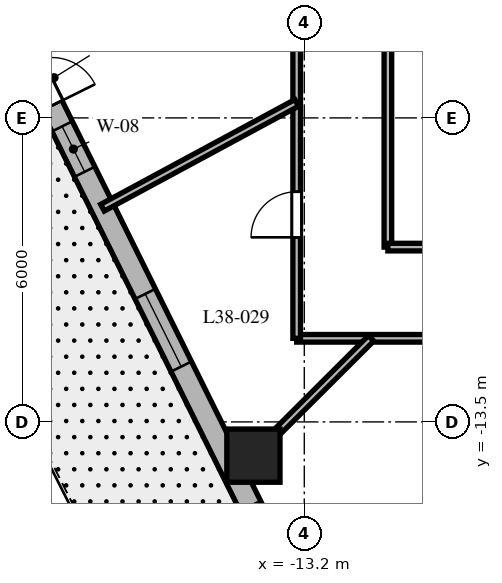
"""IFC4 building model, lengths in metres.
Left out: names, types, materials, properties, quantities, classifications, styles, units other than length and angle.
Written with IfcOpenShell. Run it as: python <this file> out.ifc"""

import sys

from ifc_helpers import new_model, si_unit, direction, frame, frame_2d, origin, origin_2d, place, context, subcontext, project, spatial, rectangle, extrude, element, fill, save


model = new_model("IFC4")
c1 = context("Model", 3, precision=1e-05, world=origin(), true_north=direction((0.0, 1.0)))
c2 = subcontext(c1, "Body", "Model", "MODEL_VIEW")
j1 = project(units=[si_unit("LENGTHUNIT", "METRE"), si_unit("PLANEANGLEUNIT", "RADIAN")], contexts=[c1])
p1 = place(None, origin())
s1 = spatial("IfcSite", under=j1, at=p1, CompositionType="ELEMENT")
p2 = place(p1, origin())
s2 = spatial("IfcBuilding", under=s1, at=p2, CompositionType="ELEMENT")
p3 = place(p2, frame((0.0, 0.0, 155.4)))
s3 = spatial("IfcBuildingStorey", under=s2, at=p3, CompositionType="ELEMENT", Elevation=155.4)
p4 = place(p3, frame((-14.204, -14.166, 0.0), z_axis=(0.0, 0.0, 1.0), x_axis=(1.0, 0.0, 0.0)))
e1 = element("IfcColumn", 1, at=p4, inside=s3, PredefinedType="COLUMN", context=c2, shape_type="SweptSolid", body=[
    extrude(rectangle(XDim=1.05, YDim=1.05, at=origin_2d()), origin(), (0.0, 0.0, 1.0), 3.7),
])
p5 = place(p3, frame((-20.618, -2.344, 0.0), z_axis=(0.0, 0.0, 1.0), x_axis=(0.444243691097, -0.895905990002, 0.0)))
e2 = element("IfcWall", 2, at=p5, inside=s3, PredefinedType="SOLIDWALL", context=c2, shape_type="SweptSolid", body=[
    extrude(rectangle(XDim=16.784, YDim=0.45, at=frame_2d((8.392, 0.0))), origin(), (0.0, 0.0, 1.0), 3.4),
])
p6 = place(p5, frame((4.535, 0.0, 0.0)))
e3 = element("IfcOpeningElement", 3, at=p6, cuts=e2, PredefinedType="OPENING", context=c2, shape_type="SweptSolid", body=[
    extrude(rectangle(XDim=0.95, YDim=2.15, at=frame_2d((0.475, 1.075))), frame((0.0, 0.235, 0.0), z_axis=(0.0, -1.0, 0.0), x_axis=(1.0, 0.0, 0.0)), (0.0, 0.0, 1.0), 0.47),
])
p7 = place(p5, frame((0.931, 0.0, 0.8)))
e4 = element("IfcOpeningElement", 4, at=p7, cuts=e2, PredefinedType="OPENING", context=c2, shape_type="SweptSolid", body=[
    extrude(rectangle(XDim=1.6, YDim=1.75, at=frame_2d((0.8, 0.875))), frame((0.0, 0.235, 0.0), z_axis=(0.0, -1.0, 0.0), x_axis=(1.0, 0.0, 0.0)), (0.0, 0.0, 1.0), 0.47),
])
p8 = place(p5, frame((5.942, 0.0, 0.8)))
e5 = element("IfcOpeningElement", 5, at=p8, cuts=e2, PredefinedType="OPENING", context=c2, shape_type="SweptSolid", body=[
    extrude(rectangle(XDim=1.0, YDim=1.65, at=frame_2d((0.5, 0.825))), frame((0.0, 0.235, 0.0), z_axis=(0.0, -1.0, 0.0), x_axis=(1.0, 0.0, 0.0)), (0.0, 0.0, 1.0), 0.47),
])
p9 = place(p5, frame((9.633, 0.0, 0.8)))
e6 = element("IfcOpeningElement", 6, at=p9, cuts=e2, PredefinedType="OPENING", context=c2, shape_type="SweptSolid", body=[
    extrude(rectangle(XDim=1.6, YDim=1.75, at=frame_2d((0.8, 0.875))), frame((0.0, 0.235, 0.0), z_axis=(0.0, -1.0, 0.0), x_axis=(1.0, 0.0, 0.0)), (0.0, 0.0, 1.0), 0.47),
])
p10 = place(p5, frame((14.303, 0.0, 0.8)))
e7 = element("IfcOpeningElement", 7, at=p10, cuts=e2, PredefinedType="OPENING", context=c2, shape_type="SweptSolid", body=[
    extrude(rectangle(XDim=1.6, YDim=1.75, at=frame_2d((0.8, 0.875))), frame((0.0, 0.235, 0.0), z_axis=(0.0, -1.0, 0.0), x_axis=(1.0, 0.0, 0.0)), (0.0, 0.0, 1.0), 0.47),
])
p11 = place(p3, frame((13.35, -11.85, 0.0), z_axis=(0.0, 0.0, 1.0), x_axis=(-1.0, 0.0, 0.0)))
e8 = element("IfcWall", 8, at=p11, inside=s3, PredefinedType="PARTITIONING", context=c2, shape_type="SweptSolid", body=[
    extrude(rectangle(XDim=26.7, YDim=0.15, at=frame_2d((13.35, 0.0))), origin(), (0.0, 0.0, 1.0), 2.84),
])
p12 = place(p11, frame((20.682, 0.0, 0.0)))
e9 = element("IfcOpeningElement", 9, at=p12, cuts=e8, PredefinedType="OPENING", context=c2, shape_type="SweptSolid", body=[
    extrude(rectangle(XDim=0.95, YDim=2.03, at=frame_2d((0.475, 1.015))), frame((0.0, 0.085, 0.0), z_axis=(0.0, -1.0, 0.0), x_axis=(1.0, 0.0, 0.0)), (0.0, 0.0, 1.0), 0.17),
])
p13 = place(p11, frame((12.362, 0.0, 0.0)))
e10 = element("IfcOpeningElement", 10, at=p13, cuts=e8, PredefinedType="OPENING", context=c2, shape_type="SweptSolid", body=[
    extrude(rectangle(XDim=0.95, YDim=2.03, at=frame_2d((0.475, 1.015))), frame((0.0, 0.085, 0.0), z_axis=(0.0, -1.0, 0.0), x_axis=(1.0, 0.0, 0.0)), (0.0, 0.0, 1.0), 0.17),
])
p14 = place(p11, frame((3.995, 0.0, 0.0)))
e11 = element("IfcOpeningElement", 11, at=p14, cuts=e8, PredefinedType="OPENING", context=c2, shape_type="SweptSolid", body=[
    extrude(rectangle(XDim=0.95, YDim=2.03, at=frame_2d((0.475, 1.015))), frame((0.0, 0.085, 0.0), z_axis=(0.0, -1.0, 0.0), x_axis=(1.0, 0.0, 0.0)), (0.0, 0.0, 1.0), 0.17),
])
p15 = place(p3, frame((-13.35, -11.85, 0.0), z_axis=(0.0, 0.0, 1.0), x_axis=(0.0, 1.0, 0.0)))
e12 = element("IfcWall", 12, at=p15, inside=s3, PredefinedType="PARTITIONING", context=c2, shape_type="SweptSolid", body=[
    extrude(rectangle(XDim=23.7, YDim=0.15, at=frame_2d((11.85, 0.0))), origin(), (0.0, 0.0, 1.0), 2.84),
])
p16 = place(p15, frame((18.389, 0.0, 0.0)))
e13 = element("IfcOpeningElement", 13, at=p16, cuts=e12, PredefinedType="OPENING", context=c2, shape_type="SweptSolid", body=[
    extrude(rectangle(XDim=0.95, YDim=2.03, at=frame_2d((0.475, 1.015))), frame((0.0, 0.085, 0.0), z_axis=(0.0, -1.0, 0.0), x_axis=(1.0, 0.0, 0.0)), (0.0, 0.0, 1.0), 0.17),
])
p17 = place(p15, frame((10.751, 0.0, 0.0)))
e14 = element("IfcOpeningElement", 14, at=p17, cuts=e12, PredefinedType="OPENING", context=c2, shape_type="SweptSolid", body=[
    extrude(rectangle(XDim=0.95, YDim=2.03, at=frame_2d((0.475, 1.015))), frame((0.0, 0.085, 0.0), z_axis=(0.0, -1.0, 0.0), x_axis=(1.0, 0.0, 0.0)), (0.0, 0.0, 1.0), 0.17),
])
p18 = place(p15, frame((5.951, 0.0, 0.0)))
e15 = element("IfcOpeningElement", 15, at=p18, cuts=e12, PredefinedType="OPENING", context=c2, shape_type="SweptSolid", body=[
    extrude(rectangle(XDim=0.9, YDim=2.03, at=frame_2d((0.45, 1.015))), frame((0.0, 0.085, 0.0), z_axis=(0.0, -1.0, 0.0), x_axis=(1.0, 0.0, 0.0)), (0.0, 0.0, 1.0), 0.17),
])
p19 = place(p15, frame((1.993, 0.0, 0.0)))
e16 = element("IfcOpeningElement", 16, at=p19, cuts=e12, PredefinedType="OPENING", context=c2, shape_type="SweptSolid", body=[
    extrude(rectangle(XDim=0.9, YDim=2.03, at=frame_2d((0.45, 1.015))), frame((0.0, 0.085, 0.0), z_axis=(0.0, -1.0, 0.0), x_axis=(1.0, 0.0, 0.0)), (0.0, 0.0, 1.0), 0.17),
])
p20 = place(p3, frame((-11.55, 2.7, 0.0), z_axis=(0.0, 0.0, 1.0), x_axis=(0.0, -1.0, 0.0)))
e17 = element("IfcWall", 17, at=p20, inside=s3, PredefinedType="PARTITIONING", context=c2, shape_type="SweptSolid", body=[
    extrude(rectangle(XDim=12.75, YDim=0.15, at=frame_2d((6.375, 0.0))), origin(), (0.0, 0.0, 1.0), 2.84),
])
p21 = place(p3, frame((-11.55, -10.05, 0.0), z_axis=(0.0, 0.0, 1.0), x_axis=(1.0, 0.0, 0.0)))
e18 = element("IfcWall", 18, at=p21, inside=s3, PredefinedType="PARTITIONING", context=c2, shape_type="SweptSolid", body=[
    extrude(rectangle(XDim=11.55, YDim=0.15, at=frame_2d((5.775, 0.0))), origin(), (0.0, 0.0, 1.0), 2.84),
])
p22 = place(p3, frame((-13.35, -7.204, 0.0), z_axis=(0.0, 0.0, 1.0), x_axis=(-0.880033329067, -0.474911928394, 0.0)))
e19 = element("IfcWall", 19, at=p22, inside=s3, PredefinedType="PARTITIONING", context=c2, shape_type="SweptSolid", body=[
    extrude(rectangle(XDim=4.355, YDim=0.15, at=frame_2d((2.178, 0.0))), origin(), (0.0, 0.0, 1.0), 2.64),
])
p23 = place(p3, frame((-11.882, -11.85, 0.0), z_axis=(0.0, 0.0, 1.0), x_axis=(-0.708037373639, -0.706174962407, 0.0)))
e20 = element("IfcWall", 20, at=p23, inside=s3, PredefinedType="PARTITIONING", context=c2, shape_type="SweptSolid", body=[
    extrude(rectangle(XDim=3.802, YDim=0.15, at=frame_2d((1.901, 0.0))), origin(), (0.0, 0.0, 1.0), 2.64),
])
p24 = place(p6, origin())
e21 = element("IfcDoor", 21, at=p24, inside=s3, OperationType="SINGLE_SWING_RIGHT", PredefinedType="DOOR", context=c2, shape_type="SweptSolid", body=[
    extrude(rectangle(XDim=0.95, YDim=2.15, at=frame_2d((0.475, 1.075))), frame((0.0, 0.025, 0.0), z_axis=(0.0, -1.0, 0.0), x_axis=(1.0, 0.0, 0.0)), (0.0, 0.0, 1.0), 0.05),
])
fill(e3, e21)
p25 = place(p8, origin())
e22 = element("IfcWindow", 22, at=p25, inside=s3, PartitioningType="SINGLE_PANEL", PredefinedType="WINDOW", context=c2, shape_type="SweptSolid", body=[
    extrude(rectangle(XDim=1.0, YDim=1.65, at=frame_2d((0.5, 0.825))), frame((0.0, 0.03, 0.0), z_axis=(0.0, -1.0, 0.0), x_axis=(1.0, 0.0, 0.0)), (0.0, 0.0, 1.0), 0.06),
])
fill(e5, e22)
p26 = place(p9, origin())
e23 = element("IfcWindow", 23, at=p26, inside=s3, PartitioningType="SINGLE_PANEL", PredefinedType="WINDOW", context=c2, shape_type="SweptSolid", body=[
    extrude(rectangle(XDim=1.6, YDim=1.75, at=frame_2d((0.8, 0.875))), frame((0.0, 0.03, 0.0), z_axis=(0.0, -1.0, 0.0), x_axis=(1.0, 0.0, 0.0)), (0.0, 0.0, 1.0), 0.06),
])
fill(e6, e23)
p27 = place(p19, origin())
e24 = element("IfcDoor", 24, at=p27, inside=s3, OperationType="SINGLE_SWING_LEFT", PredefinedType="DOOR", context=c2, shape_type="SweptSolid", body=[
    extrude(rectangle(XDim=0.9, YDim=2.03, at=frame_2d((0.45, 1.015))), frame((0.0, 0.025, 0.0), z_axis=(0.0, -1.0, 0.0), x_axis=(1.0, 0.0, 0.0)), (0.0, 0.0, 1.0), 0.05),
])
fill(e16, e24)
save(model, sys.argv[1])
